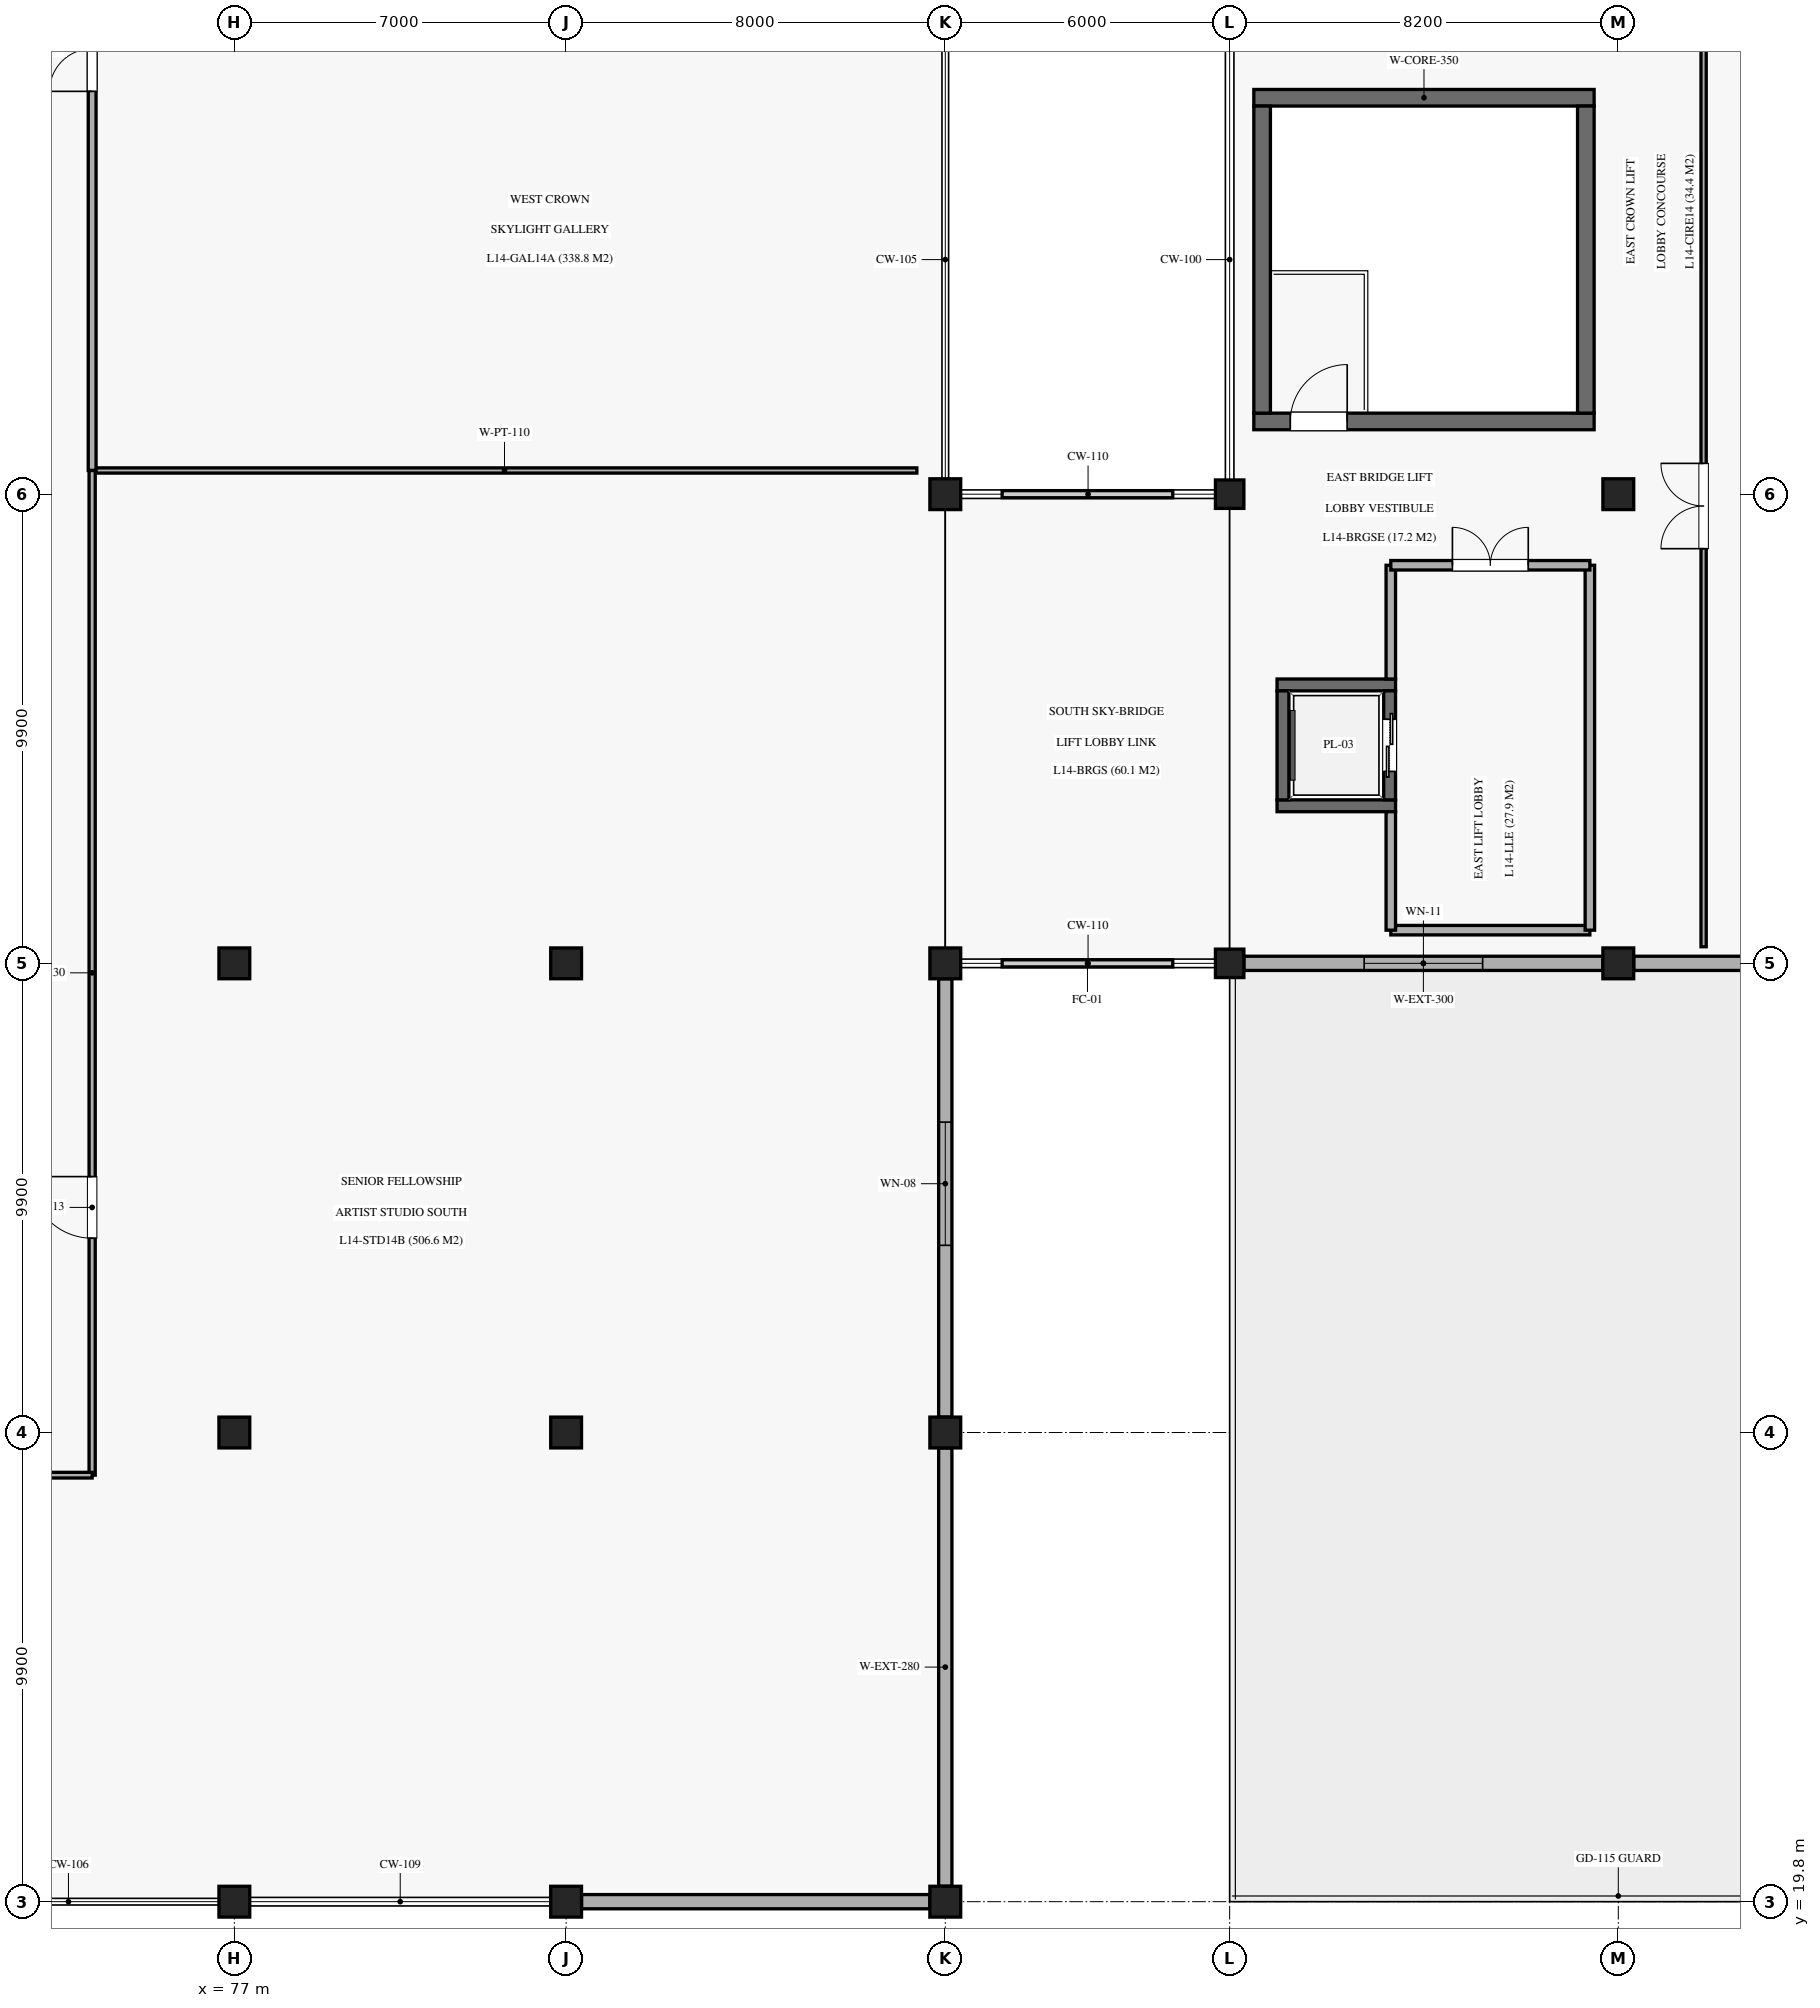
"""IFC4 building model, lengths in metres.
Left out: names, types, materials, properties, quantities, classifications, styles, units other than length and angle.
Written with IfcOpenShell. Run it as: python <this file> out.ifc"""

import sys

from ifc_helpers import new_model, si_unit, direction, frame, frame_2d, origin, origin_2d, place, context, subcontext, project, spatial, rectangle, extrude, element, fill, save


model = new_model("IFC4")
c1 = context("Model", 3, precision=1e-05, world=origin(), true_north=direction((0.0, 1.0)))
c2 = subcontext(c1, "Body", "Model", "MODEL_VIEW")
j1 = project(units=[si_unit("LENGTHUNIT", "METRE"), si_unit("PLANEANGLEUNIT", "RADIAN")], contexts=[c1])
p1 = place(None, origin())
s1 = spatial("IfcSite", under=j1, at=p1, CompositionType="ELEMENT")
p2 = place(p1, origin())
s2 = spatial("IfcBuilding", under=s1, at=p2, CompositionType="ELEMENT")
p3 = place(p2, frame((0.0, 0.0, 70.38)))
s3 = spatial("IfcBuildingStorey", under=s2, at=p3, CompositionType="ELEMENT", Elevation=70.38)
for number, where, z_axis, x_axis in (
    (1, (77.0, 19.8, 0.0), (0.0, 0.0, 1.0), (1.0, 0.0, 0.0)),
    (2, (77.0, 29.7, 0.0), (0.0, 0.0, 1.0), (1.0, 0.0, 0.0)),
    (3, (77.0, 39.6, 0.0), (0.0, 0.0, 1.0), (1.0, 0.0, 0.0)),
    (4, (84.0, 19.8, 0.0), (0.0, 0.0, 1.0), (1.0, 0.0, 0.0)),
    (5, (84.0, 29.7, 0.0), (0.0, 0.0, 1.0), (1.0, 0.0, 0.0)),
    (6, (84.0, 39.6, 0.0), (0.0, 0.0, 1.0), (1.0, 0.0, 0.0)),
    (7, (92.0, 19.8, 0.0), (0.0, 0.0, 1.0), (1.0, 0.0, 0.0)),
    (8, (92.0, 29.7, 0.0), (0.0, 0.0, 1.0), (1.0, 0.0, 0.0)),
    (9, (92.0, 39.6, 0.0), (0.0, 0.0, 1.0), (1.0, 0.0, 0.0)),
    (10, (92.0, 49.5, 0.0), (0.0, 0.0, 1.0), (1.0, 0.0, 0.0)),
):
    element("IfcColumn", number, at=place(p3, frame(where, z_axis=z_axis, x_axis=x_axis)), inside=s3, PredefinedType="COLUMN", context=c2, shape_type="SweptSolid", body=[
        extrude(rectangle(XDim=0.65, YDim=0.65, at=origin_2d()), origin(), (0.0, 0.0, 1.0), 4.08),
    ])
for number, where, z_axis, x_axis in (
    (11, (98.0, 39.6, 0.0), (0.0, 0.0, 1.0), (1.0, 0.0, 0.0)),
    (12, (98.0, 49.5, 0.0), (0.0, 0.0, 1.0), (1.0, 0.0, 0.0)),
):
    element("IfcColumn", number, at=place(p3, frame(where, z_axis=z_axis, x_axis=x_axis)), inside=s3, PredefinedType="COLUMN", context=c2, shape_type="SweptSolid", body=[
        extrude(rectangle(XDim=0.6, YDim=0.6, at=origin_2d()), origin(), (0.0, 0.0, 1.0), 4.08),
    ])
for number, where, z_axis, x_axis in (
    (13, (106.2, 39.6, 0.0), (0.0, 0.0, 1.0), (1.0, 0.0, 0.0)),
    (14, (106.2, 49.5, 0.0), (0.0, 0.0, 1.0), (1.0, 0.0, 0.0)),
):
    element("IfcColumn", number, at=place(p3, frame(where, z_axis=z_axis, x_axis=x_axis)), inside=s3, PredefinedType="COLUMN", context=c2, shape_type="SweptSolid", body=[
        extrude(rectangle(XDim=0.65, YDim=0.65, at=origin_2d()), origin(), (0.0, 0.0, 1.0), 4.08),
    ])
p4 = place(p3, frame((92.0, 20.125, 0.0), z_axis=(0.0, 0.0, 1.0), x_axis=(0.0, 1.0, 0.0)))
e15 = element("IfcWall", 15, at=p4, inside=s3, PredefinedType="SOLIDWALL", context=c2, shape_type="SweptSolid", body=[
    extrude(rectangle(XDim=9.25, YDim=0.28, at=frame_2d((4.625, 0.0))), origin(), (0.0, 0.0, 1.0), 3.08),
])
p5 = place(p3, frame((92.0, 30.025, 0.0), z_axis=(0.0, 0.0, 1.0), x_axis=(0.0, 1.0, 0.0)))
e16 = element("IfcWall", 16, at=p5, inside=s3, PredefinedType="SOLIDWALL", context=c2, shape_type="SweptSolid", body=[
    extrude(rectangle(XDim=9.25, YDim=0.28, at=frame_2d((4.625, 0.0))), origin(), (0.0, 0.0, 1.0), 3.08),
])
p6 = place(p5, frame((3.625, 0.0, 1.15)))
e17 = element("IfcOpeningElement", 17, at=p6, cuts=e16, PredefinedType="OPENING", context=c2, shape_type="SweptSolid", body=[
    extrude(rectangle(XDim=2.6, YDim=1.85, at=frame_2d((1.3, 0.925))), frame((0.0, 0.15, 0.0), z_axis=(0.0, -1.0, 0.0), x_axis=(1.0, 0.0, 0.0)), (0.0, 0.0, 1.0), 0.3),
])
p7 = place(p3, frame((84.325, 19.8, 0.0), z_axis=(0.0, 0.0, 1.0), x_axis=(1.0, 0.0, 0.0)))
e18 = element("IfcWall", 18, at=p7, inside=s3, PredefinedType="SOLIDWALL", context=c2, shape_type="SweptSolid", body=[
    extrude(rectangle(XDim=7.35, YDim=0.3, at=frame_2d((3.675, 0.0))), origin(), (0.0, 0.0, 1.0), 3.08),
])
p8 = place(p3, frame((98.3, 39.6, 0.0), z_axis=(0.0, 0.0, 1.0), x_axis=(1.0, 0.0, 0.0)))
e19 = element("IfcWall", 19, at=p8, inside=s3, PredefinedType="SOLIDWALL", context=c2, shape_type="SweptSolid", body=[
    extrude(rectangle(XDim=7.575, YDim=0.3, at=frame_2d((3.788, 0.0))), origin(), (0.0, 0.0, 1.0), 3.08),
])
p9 = place(p8, frame((2.538, 0.0, 1.15)))
e20 = element("IfcOpeningElement", 20, at=p9, cuts=e19, PredefinedType="OPENING", context=c2, shape_type="SweptSolid", body=[
    extrude(rectangle(XDim=2.5, YDim=1.6, at=frame_2d((1.25, 0.8))), frame((0.0, 0.16, 0.0), z_axis=(0.0, -1.0, 0.0), x_axis=(1.0, 0.0, 0.0)), (0.0, 0.0, 1.0), 0.32),
])
p10 = place(p3, frame((106.525, 39.6, 0.0), z_axis=(0.0, 0.0, 1.0), x_axis=(1.0, 0.0, 0.0)))
e21 = element("IfcWall", 21, at=p10, inside=s3, PredefinedType="SOLIDWALL", context=c2, shape_type="SweptSolid", body=[
    extrude(rectangle(XDim=7.575, YDim=0.3, at=frame_2d((3.788, 0.0))), origin(), (0.0, 0.0, 1.0), 3.08),
])
p11 = place(p10, frame((2.888, 0.0, 0.0)))
e22 = element("IfcOpeningElement", 22, at=p11, cuts=e21, PredefinedType="OPENING", context=c2, shape_type="SweptSolid", body=[
    extrude(rectangle(XDim=1.8, YDim=2.25, at=frame_2d((0.9, 1.125))), frame((0.0, 0.16, 0.0), z_axis=(0.0, -1.0, 0.0), x_axis=(1.0, 0.0, 0.0)), (0.0, 0.0, 1.0), 0.32),
])
p12 = place(p3, frame((98.51, 51.035, 0.0), z_axis=(0.0, 0.0, 1.0), x_axis=(1.0, 0.0, 0.0)))
e23 = element("IfcWall", 23, at=p12, inside=s3, PredefinedType="SHEAR", context=c2, shape_type="SweptSolid", body=[
    extrude(rectangle(XDim=7.18, YDim=0.35, at=frame_2d((3.59, 0.0))), origin(), (0.0, 0.0, 1.0), 3.83),
])
p13 = place(p12, frame((0.77, 0.0, 0.0)))
e24 = element("IfcOpeningElement", 24, at=p13, cuts=e23, PredefinedType="OPENING", context=c2, shape_type="SweptSolid", body=[
    extrude(rectangle(XDim=1.2, YDim=2.2, at=frame_2d((0.6, 1.1))), frame((0.0, 0.185, 0.0), z_axis=(0.0, -1.0, 0.0), x_axis=(1.0, 0.0, 0.0)), (0.0, 0.0, 1.0), 0.37),
])
p14 = place(p3, frame((98.51, 57.865, 0.0), z_axis=(0.0, 0.0, 1.0), x_axis=(1.0, 0.0, 0.0)))
e25 = element("IfcWall", 25, at=p14, inside=s3, PredefinedType="SHEAR", context=c2, shape_type="SweptSolid", body=[
    extrude(rectangle(XDim=7.18, YDim=0.35, at=frame_2d((3.59, 0.0))), origin(), (0.0, 0.0, 1.0), 3.83),
])
for number, where, z_axis, x_axis in (
    (26, (98.685, 51.21, 0.0), (0.0, 0.0, 1.0), (0.0, 1.0, 0.0)),
    (27, (105.515, 51.21, 0.0), (0.0, 0.0, 1.0), (0.0, 1.0, 0.0)),
):
    element("IfcWall", number, at=place(p3, frame(where, z_axis=z_axis, x_axis=x_axis)), inside=s3, PredefinedType="SHEAR", context=c2, shape_type="SweptSolid", body=[
        extrude(rectangle(XDim=6.48, YDim=0.35, at=frame_2d((3.24, 0.0))), origin(), (0.0, 0.0, 1.0), 3.83),
    ])
for number, where, z_axis, x_axis in (
    (28, (99.0, 42.925, 0.0), (0.0, 0.0, 1.0), (1.0, 0.0, 0.0)),
    (29, (99.0, 45.475, 0.0), (0.0, 0.0, 1.0), (1.0, 0.0, 0.0)),
):
    element("IfcWall", number, at=place(p3, frame(where, z_axis=z_axis, x_axis=x_axis)), inside=s3, PredefinedType="SOLIDWALL", context=c2, shape_type="SweptSolid", body=[
        extrude(rectangle(XDim=2.5, YDim=0.25, at=frame_2d((1.25, 0.0))), origin(), (0.0, 0.0, 1.0), 3.81),
    ])
p15 = place(p3, frame((99.125, 43.05, 0.0), z_axis=(0.0, 0.0, 1.0), x_axis=(0.0, 1.0, 0.0)))
e30 = element("IfcWall", 30, at=p15, inside=s3, PredefinedType="SOLIDWALL", context=c2, shape_type="SweptSolid", body=[
    extrude(rectangle(XDim=2.3, YDim=0.25, at=frame_2d((1.15, 0.0))), origin(), (0.0, 0.0, 1.0), 3.81),
])
p16 = place(p3, frame((101.375, 43.05, 0.0), z_axis=(0.0, 0.0, 1.0), x_axis=(0.0, 1.0, 0.0)))
e31 = element("IfcWall", 31, at=p16, inside=s3, PredefinedType="SOLIDWALL", context=c2, shape_type="SweptSolid", body=[
    extrude(rectangle(XDim=2.3, YDim=0.25, at=frame_2d((1.15, 0.0))), origin(), (0.0, 0.0, 1.0), 3.81),
])
p17 = place(p16, frame((0.6, 0.0, 0.0)))
e32 = element("IfcOpeningElement", 32, at=p17, cuts=e31, PredefinedType="OPENING", context=c2, shape_type="SweptSolid", body=[
    extrude(rectangle(XDim=1.1, YDim=2.2, at=frame_2d((0.55, 1.1))), frame((0.0, 0.135, 0.0), z_axis=(0.0, -1.0, 0.0), x_axis=(1.0, 0.0, 0.0)), (0.0, 0.0, 1.0), 0.27),
])
p18 = place(p3, frame((101.4, 40.3, 0.0), z_axis=(0.0, 0.0, 1.0), x_axis=(1.0, 0.0, 0.0)))
e33 = element("IfcWall", 33, at=p18, inside=s3, PredefinedType="SOLIDWALL", context=c2, shape_type="SweptSolid", body=[
    extrude(rectangle(XDim=4.2, YDim=0.2, at=frame_2d((2.1, 0.0))), origin(), (0.0, 0.0, 1.0), 2.95),
])
p19 = place(p3, frame((101.4, 40.3, 0.0), z_axis=(0.0, 0.0, 1.0), x_axis=(0.0, 1.0, 0.0)))
e34 = element("IfcWall", 34, at=p19, inside=s3, PredefinedType="SOLIDWALL", context=c2, shape_type="SweptSolid", body=[
    extrude(rectangle(XDim=2.5, YDim=0.2, at=frame_2d((1.25, 0.0))), origin(), (0.0, 0.0, 1.0), 2.95),
])
p20 = place(p3, frame((101.4, 45.6, 0.0), z_axis=(0.0, 0.0, 1.0), x_axis=(0.0, 1.0, 0.0)))
e35 = element("IfcWall", 35, at=p20, inside=s3, PredefinedType="SOLIDWALL", context=c2, shape_type="SweptSolid", body=[
    extrude(rectangle(XDim=2.4, YDim=0.2, at=frame_2d((1.2, 0.0))), origin(), (0.0, 0.0, 1.0), 2.95),
])
p21 = place(p3, frame((105.6, 40.3, 0.0), z_axis=(0.0, 0.0, 1.0), x_axis=(0.0, 1.0, 0.0)))
e36 = element("IfcWall", 36, at=p21, inside=s3, PredefinedType="SOLIDWALL", context=c2, shape_type="SweptSolid", body=[
    extrude(rectangle(XDim=7.7, YDim=0.2, at=frame_2d((3.85, 0.0))), origin(), (0.0, 0.0, 1.0), 2.95),
])
p22 = place(p3, frame((101.4, 48.0, 0.0), z_axis=(0.0, 0.0, 1.0), x_axis=(1.0, 0.0, 0.0)))
e37 = element("IfcWall", 37, at=p22, inside=s3, PredefinedType="SOLIDWALL", context=c2, shape_type="SweptSolid", body=[
    extrude(rectangle(XDim=4.2, YDim=0.2, at=frame_2d((2.1, 0.0))), origin(), (0.0, 0.0, 1.0), 2.95),
])
p23 = place(p22, frame((1.3, 0.0, 0.0)))
e38 = element("IfcOpeningElement", 38, at=p23, cuts=e37, PredefinedType="OPENING", context=c2, shape_type="SweptSolid", body=[
    extrude(rectangle(XDim=1.6, YDim=2.2, at=frame_2d((0.8, 1.1))), frame((0.0, 0.11, 0.0), z_axis=(0.0, -1.0, 0.0), x_axis=(1.0, 0.0, 0.0)), (0.0, 0.0, 1.0), 0.22),
])
p24 = place(p3, frame((74.0, 50.0, 0.0), z_axis=(0.0, 0.0, 1.0), x_axis=(1.0, 0.0, 0.0)))
e39 = element("IfcWall", 39, at=p24, inside=s3, PredefinedType="PARTITIONING", context=c2, shape_type="SweptSolid", body=[
    extrude(rectangle(XDim=17.4, YDim=0.11, at=frame_2d((8.7, 0.0))), origin(), (0.0, 0.0, 1.0), 2.95),
])
p25 = place(p3, frame((74.0, 50.0, 0.0), z_axis=(0.0, 0.0, 1.0), x_axis=(0.0, 1.0, 0.0)))
e40 = element("IfcWall", 40, at=p25, inside=s3, PredefinedType="PARTITIONING", context=c2, shape_type="SweptSolid", body=[
    extrude(rectangle(XDim=19.0, YDim=0.165, at=frame_2d((9.5, 0.0))), origin(), (0.0, 0.0, 1.0), 2.95),
])
p26 = place(p25, frame((8.0, 0.0, 0.0)))
e41 = element("IfcOpeningElement", 41, at=p26, cuts=e40, PredefinedType="OPENING", context=c2, shape_type="SweptSolid", body=[
    extrude(rectangle(XDim=1.8, YDim=2.45, at=frame_2d((0.9, 1.225))), frame((0.0, 0.093, 0.0), z_axis=(0.0, -1.0, 0.0), x_axis=(1.0, 0.0, 0.0)), (0.0, 0.0, 1.0), 0.185),
])
p27 = place(p3, frame((74.0, 28.8, 0.0), z_axis=(0.0, 0.0, 1.0), x_axis=(0.0, 1.0, 0.0)))
e42 = element("IfcWall", 42, at=p27, inside=s3, PredefinedType="PARTITIONING", context=c2, shape_type="SweptSolid", body=[
    extrude(rectangle(XDim=21.2, YDim=0.13, at=frame_2d((10.6, 0.0))), origin(), (0.0, 0.0, 1.0), 2.95),
])
p28 = place(p27, frame((5.0, 0.0, 0.0)))
e43 = element("IfcOpeningElement", 43, at=p28, cuts=e42, PredefinedType="OPENING", context=c2, shape_type="SweptSolid", body=[
    extrude(rectangle(XDim=1.3, YDim=2.25, at=frame_2d((0.65, 1.125))), frame((0.0, 0.075, 0.0), z_axis=(0.0, -1.0, 0.0), x_axis=(1.0, 0.0, 0.0)), (0.0, 0.0, 1.0), 0.15),
])
p29 = place(p3, frame((71.8, 28.8, 0.0), z_axis=(0.0, 0.0, 1.0), x_axis=(1.0, 0.0, 0.0)))
e44 = element("IfcWall", 44, at=p29, inside=s3, PredefinedType="PARTITIONING", context=c2, shape_type="SweptSolid", body=[
    extrude(rectangle(XDim=2.2, YDim=0.12, at=frame_2d((1.1, 0.0))), origin(), (0.0, 0.0, 1.0), 2.95),
])
p30 = place(p3, frame((108.0, 39.95, 0.0), z_axis=(0.0, 0.0, 1.0), x_axis=(0.0, 1.0, 0.0)))
e45 = element("IfcWall", 45, at=p30, inside=s3, PredefinedType="PARTITIONING", context=c2, shape_type="SweptSolid", body=[
    extrude(rectangle(XDim=29.0, YDim=0.11, at=frame_2d((14.5, 0.0))), origin(), (0.0, 0.0, 1.0), 2.95),
])
p31 = place(p30, frame((8.4, 0.0, 0.0)))
e46 = element("IfcOpeningElement", 46, at=p31, cuts=e45, PredefinedType="OPENING", context=c2, shape_type="SweptSolid", body=[
    extrude(rectangle(XDim=1.8, YDim=2.45, at=frame_2d((0.9, 1.225))), frame((0.0, 0.065, 0.0), z_axis=(0.0, -1.0, 0.0), x_axis=(1.0, 0.0, 0.0)), (0.0, 0.0, 1.0), 0.13),
])
p32 = place(p6, origin())
e47 = element("IfcWindow", 47, at=p32, inside=s3, PartitioningType="SINGLE_PANEL", PredefinedType="WINDOW", context=c2, shape_type="SweptSolid", body=[
    extrude(rectangle(XDim=2.6, YDim=1.85, at=frame_2d((1.3, 0.925))), frame((0.0, 0.03, 0.0), z_axis=(0.0, -1.0, 0.0), x_axis=(1.0, 0.0, 0.0)), (0.0, 0.0, 1.0), 0.06),
])
fill(e17, e47)
p33 = place(p9, origin())
e48 = element("IfcWindow", 48, at=p33, inside=s3, PartitioningType="SINGLE_PANEL", PredefinedType="WINDOW", context=c2, shape_type="SweptSolid", body=[
    extrude(rectangle(XDim=2.5, YDim=1.6, at=frame_2d((1.25, 0.8))), frame((0.0, 0.03, 0.0), z_axis=(0.0, -1.0, 0.0), x_axis=(1.0, 0.0, 0.0)), (0.0, 0.0, 1.0), 0.06),
])
fill(e20, e48)
p34 = place(p13, origin())
e49 = element("IfcDoor", 49, at=p34, inside=s3, OperationType="SINGLE_SWING_RIGHT", PredefinedType="DOOR", context=c2, shape_type="SweptSolid", body=[
    extrude(rectangle(XDim=1.2, YDim=2.2, at=frame_2d((0.6, 1.1))), frame((0.0, 0.025, 0.0), z_axis=(0.0, -1.0, 0.0), x_axis=(1.0, 0.0, 0.0)), (0.0, 0.0, 1.0), 0.05),
])
fill(e24, e49)
p35 = place(p17, origin())
e50 = element("IfcDoor", 50, at=p35, inside=s3, OperationType="DOUBLE_DOOR_SLIDING", PredefinedType="DOOR", context=c2, shape_type="SweptSolid", body=[
    extrude(rectangle(XDim=1.1, YDim=2.2, at=frame_2d((0.55, 1.1))), frame((0.0, 0.025, 0.0), z_axis=(0.0, -1.0, 0.0), x_axis=(1.0, 0.0, 0.0)), (0.0, 0.0, 1.0), 0.05),
])
fill(e32, e50)
p36 = place(p23, origin())
e51 = element("IfcDoor", 51, at=p36, inside=s3, OperationType="DOUBLE_DOOR_SINGLE_SWING", PredefinedType="DOOR", context=c2, shape_type="SweptSolid", body=[
    extrude(rectangle(XDim=1.6, YDim=2.2, at=frame_2d((0.8, 1.1))), frame((0.0, 0.025, 0.0), z_axis=(0.0, -1.0, 0.0), x_axis=(1.0, 0.0, 0.0)), (0.0, 0.0, 1.0), 0.05),
])
fill(e38, e51)
p37 = place(p26, origin())
e52 = element("IfcDoor", 52, at=p37, inside=s3, OperationType="DOUBLE_DOOR_SINGLE_SWING", PredefinedType="DOOR", context=c2, shape_type="SweptSolid", body=[
    extrude(rectangle(XDim=1.8, YDim=2.45, at=frame_2d((0.9, 1.225))), frame((0.0, 0.025, 0.0), z_axis=(0.0, -1.0, 0.0), x_axis=(1.0, 0.0, 0.0)), (0.0, 0.0, 1.0), 0.05),
])
fill(e41, e52)
p38 = place(p28, origin())
e53 = element("IfcDoor", 53, at=p38, inside=s3, OperationType="SINGLE_SWING_RIGHT", PredefinedType="DOOR", context=c2, shape_type="SweptSolid", body=[
    extrude(rectangle(XDim=1.3, YDim=2.25, at=frame_2d((0.65, 1.125))), frame((0.0, 0.025, 0.0), z_axis=(0.0, -1.0, 0.0), x_axis=(1.0, 0.0, 0.0)), (0.0, 0.0, 1.0), 0.05),
])
fill(e43, e53)
p39 = place(p31, origin())
e54 = element("IfcDoor", 54, at=p39, inside=s3, OperationType="DOUBLE_DOOR_SINGLE_SWING", PredefinedType="DOOR", context=c2, shape_type="SweptSolid", body=[
    extrude(rectangle(XDim=1.8, YDim=2.45, at=frame_2d((0.9, 1.225))), frame((0.0, 0.025, 0.0), z_axis=(0.0, -1.0, 0.0), x_axis=(1.0, 0.0, 0.0)), (0.0, 0.0, 1.0), 0.05),
])
fill(e46, e54)
save(model, sys.argv[1])
